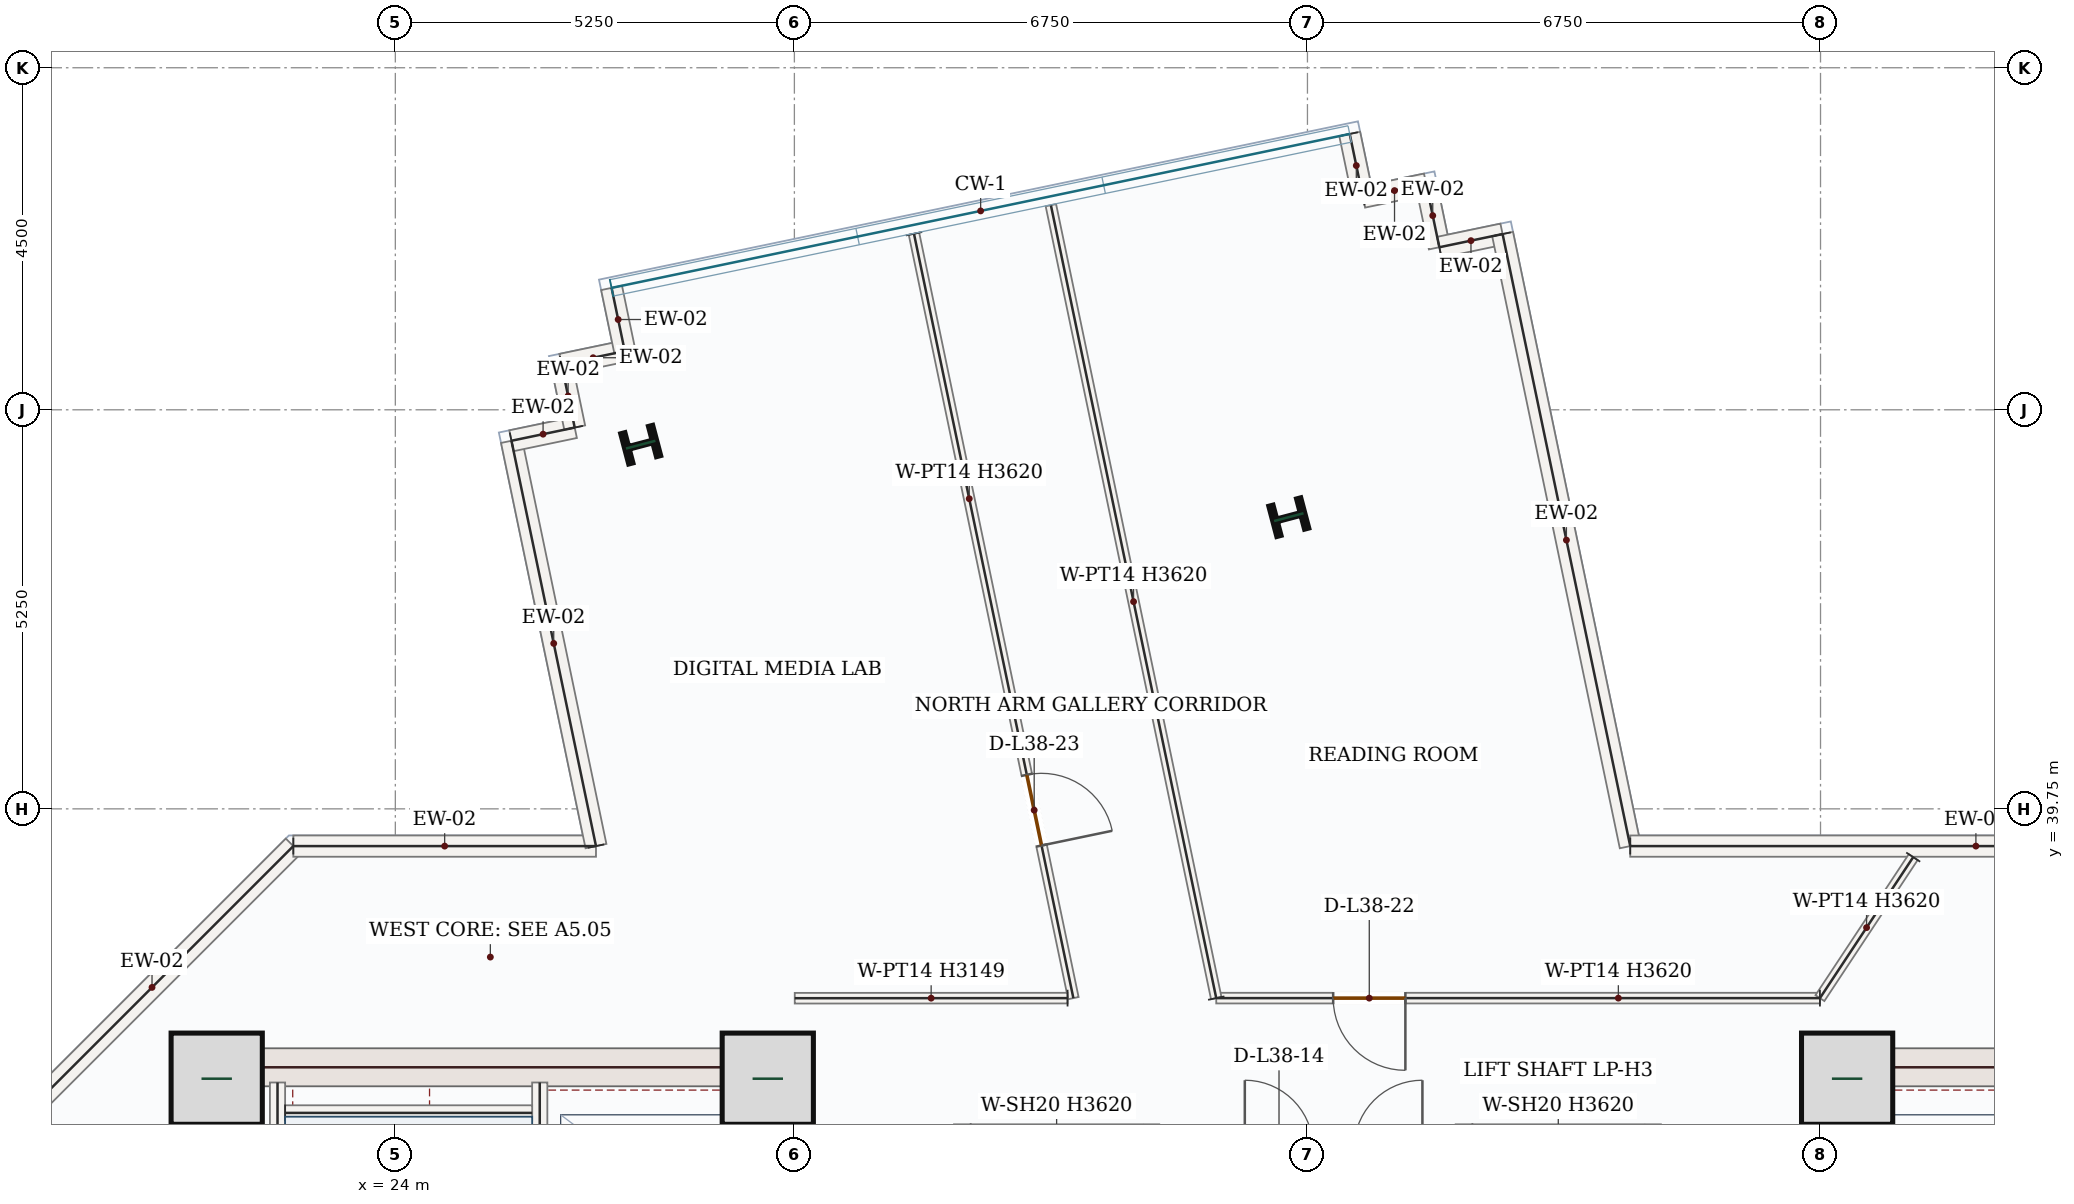
"""IFC4 building model, lengths in metres.
Left out: names, types, materials, properties, quantities, classifications, styles, units other than length and angle.
Written with IfcOpenShell. Run it as: python <this file> out.ifc"""

import sys

from ifc_helpers import new_model, si_unit, direction, frame, frame_2d, origin, origin_2d, place, context, subcontext, project, spatial, rectangle, i_section, extrude, source, transform, mapped, element, fill, save


model = new_model("IFC4")
c1 = context("Model", 3, precision=1e-05, world=origin(), true_north=direction((0.0, 1.0)))
c2 = subcontext(c1, "Body", "Model", "MODEL_VIEW")
j1 = project(units=[si_unit("LENGTHUNIT", "METRE"), si_unit("PLANEANGLEUNIT", "RADIAN")], contexts=[c1])
p1 = place(None, origin())
s1 = spatial("IfcSite", under=j1, at=p1, CompositionType="ELEMENT")
p2 = place(p1, origin())
s2 = spatial("IfcBuilding", under=s1, at=p2, CompositionType="ELEMENT")
p3 = place(p2, frame((0.0, 0.0, 166.8)))
s3 = spatial("IfcBuildingStorey", under=s2, at=p3, CompositionType="ELEMENT", Elevation=166.8)
m1 = source(origin(), c2, "Body", "SweptSolid", [
    extrude(rectangle(XDim=8.55, YDim=0.5, at=frame_2d((4.275, 0.0))), origin(), (0.0, 0.0, 1.0), 3.62),
])
p4 = place(p3, frame((21.5, 28.05, 0.0), z_axis=(0.0, 0.0, 1.0), x_axis=(0.0, 1.0, 0.0)))
e1 = element("IfcWall", 1, at=p4, inside=s3, PredefinedType="SHEAR", context=c2, shape_type="MappedRepresentation", body=[
    mapped(m1, transform((0.0, 0.0, 0.0), x_axis=(1.0, 0.0, 0.0), y_axis=(0.0, 1.0, 0.0), z_axis=(0.0, 0.0, 1.0), scale=1.0)),
])
p5 = place(p3, frame((29.0, 28.05, 0.0), z_axis=(0.0, 0.0, 1.0), x_axis=(0.0, 1.0, 0.0)))
e2 = element("IfcWall", 2, at=p5, inside=s3, PredefinedType="SHEAR", context=c2, shape_type="SweptSolid", body=[
    extrude(rectangle(XDim=8.55, YDim=0.5, at=frame_2d((4.275, 0.0))), origin(), (0.0, 0.0, 1.0), 3.62),
])
p6 = place(p5, frame((1.5, 0.0, 0.0)))
e3 = element("IfcOpeningElement", 3, at=p6, cuts=e2, PredefinedType="OPENING", context=c2, shape_type="SweptSolid", body=[
    extrude(rectangle(XDim=1.1, YDim=2.2, at=frame_2d((0.55, 1.1))), frame((0.0, 0.26, 0.0), z_axis=(0.0, -1.0, 0.0), x_axis=(1.0, 0.0, 0.0)), (0.0, 0.0, 1.0), 0.52),
])
m2 = source(origin(), c2, "Body", "SweptSolid", [
    extrude(rectangle(XDim=7.0, YDim=0.5, at=frame_2d((3.5, 0.0))), origin(), (0.0, 0.0, 1.0), 3.62),
])
p7 = place(p3, frame((21.75, 36.35, 0.0), z_axis=(0.0, 0.0, 1.0), x_axis=(1.0, 0.0, 0.0)))
e4 = element("IfcWall", 4, at=p7, inside=s3, PredefinedType="SHEAR", context=c2, shape_type="MappedRepresentation", body=[
    mapped(m2, transform((0.0, 0.0, 0.0), x_axis=(1.0, 0.0, 0.0), y_axis=(0.0, 1.0, 0.0), z_axis=(0.0, 0.0, 1.0), scale=1.0)),
])
p8 = place(p3, frame((43.0, 28.05, 0.0), z_axis=(0.0, 0.0, 1.0), x_axis=(0.0, 1.0, 0.0)))
e5 = element("IfcWall", 5, at=p8, inside=s3, PredefinedType="SHEAR", context=c2, shape_type="SweptSolid", body=[
    extrude(rectangle(XDim=8.55, YDim=0.5, at=frame_2d((4.275, 0.0))), origin(), (0.0, 0.0, 1.0), 3.62),
])
p9 = place(p8, frame((1.5, 0.0, 0.0)))
e6 = element("IfcOpeningElement", 6, at=p9, cuts=e5, PredefinedType="OPENING", context=c2, shape_type="SweptSolid", body=[
    extrude(rectangle(XDim=1.1, YDim=2.2, at=frame_2d((0.55, 1.1))), frame((0.0, 0.26, 0.0), z_axis=(0.0, -1.0, 0.0), x_axis=(1.0, 0.0, 0.0)), (0.0, 0.0, 1.0), 0.52),
])
p10 = place(p3, frame((43.25, 36.35, 0.0), z_axis=(0.0, 0.0, 1.0), x_axis=(1.0, 0.0, 0.0)))
e7 = element("IfcWall", 7, at=p10, inside=s3, PredefinedType="SHEAR", context=c2, shape_type="MappedRepresentation", body=[
    mapped(m2, transform((0.0, 0.0, 0.0), x_axis=(1.0, 0.0, 0.0), y_axis=(0.0, 1.0, 0.0), z_axis=(0.0, 0.0, 1.0), scale=1.0)),
])
m3 = source(origin(), c2, "Body", "SweptSolid", [
    extrude(rectangle(XDim=1.2, YDim=1.2, at=origin_2d()), origin(), (0.0, 0.0, 1.0), 3.9),
])
for number, where, z_axis, x_axis in (
    (8, (21.65, 36.2, 0.0), (0.0, 0.0, 1.0), (1.0, 0.0, 0.0)),
    (9, (28.9, 36.2, 0.0), (0.0, 0.0, 1.0), (1.0, 0.0, 0.0)),
    (10, (43.1, 36.2, 0.0), (0.0, 0.0, 1.0), (1.0, 0.0, 0.0)),
):
    element("IfcColumn", number, at=place(p3, frame(where, z_axis=z_axis, x_axis=x_axis)), inside=s3, PredefinedType="COLUMN", context=c2, shape_type="MappedRepresentation", body=[
        mapped(m3, transform((0.0, 0.0, 0.0), x_axis=(1.0, 0.0, 0.0), y_axis=(0.0, 1.0, 0.0), z_axis=(0.0, 0.0, 1.0), scale=1.0)),
    ])
m4 = source(origin(), c2, "Body", "SweptSolid", [
    extrude(i_section(OverallWidth=0.412, OverallDepth=0.435, WebThickness=0.036, FlangeThickness=0.057, FilletRadius=0.018, at=origin_2d()), origin(), (0.0, 0.0, 1.0), 3.9),
])
for number, where, z_axis, x_axis in (
    (11, (35.755, 43.588, 0.0), (0.0, 0.0, 1.0), (-0.255, 0.967, 0.0)),
    (12, (27.228, 44.541, 0.0), (0.0, 0.0, 1.0), (-0.255, 0.967, 0.0)),
):
    element("IfcColumn", number, at=place(p3, frame(where, z_axis=z_axis, x_axis=x_axis)), inside=s3, PredefinedType="COLUMN", context=c2, shape_type="MappedRepresentation", body=[
        mapped(m4, transform((0.0, 0.0, 0.0), x_axis=(1.0, 0.0, 0.0), y_axis=(0.0, 1.0, 0.0), z_axis=(0.0, 0.0, 1.0), scale=1.0)),
    ])
m5 = source(origin(), c2, "Body", "SweptSolid", [
    extrude(rectangle(XDim=5.258, YDim=0.28, at=frame_2d((2.629, 0.0))), origin(), (0.0, 0.0, 1.0), 3.62),
])
p11 = place(p3, frame((18.94, 35.542, 0.0), z_axis=(0.0, 0.0, 1.0), x_axis=(0.707106781187, 0.707106781187, 0.0)))
e13 = element("IfcWall", 13, at=p11, inside=s3, PredefinedType="SOLIDWALL", context=c2, shape_type="MappedRepresentation", body=[
    mapped(m5, transform((0.0, 0.0, 0.0), x_axis=(1.0, 0.0, 0.0), y_axis=(0.0, 1.0, 0.0), z_axis=(0.0, 0.0, 1.0), scale=1.0)),
])
m6 = source(origin(), c2, "Body", "SweptSolid", [
    extrude(rectangle(XDim=3.982, YDim=0.28, at=frame_2d((1.991, 0.0))), origin(), (0.0, 0.0, 1.0), 3.62),
])
p12 = place(p3, frame((22.658, 39.26, 0.0), z_axis=(0.0, 0.0, 1.0), x_axis=(1.0, 0.0, 0.0)))
e14 = element("IfcWall", 14, at=p12, inside=s3, PredefinedType="SOLIDWALL", context=c2, shape_type="MappedRepresentation", body=[
    mapped(m6, transform((0.0, 0.0, 0.0), x_axis=(1.0, 0.0, 0.0), y_axis=(0.0, 1.0, 0.0), z_axis=(0.0, 0.0, 1.0), scale=1.0)),
])
m7 = source(origin(), c2, "Body", "SweptSolid", [
    extrude(rectangle(XDim=5.447, YDim=0.28, at=frame_2d((2.724, 0.0))), origin(), (0.0, 0.0, 1.0), 3.62),
])
p13 = place(p3, frame((26.64, 39.26, 0.0), z_axis=(0.0, 0.0, 1.0), x_axis=(-0.204151126022, 0.978939384101, 0.0)))
e15 = element("IfcWall", 15, at=p13, inside=s3, PredefinedType="SOLIDWALL", context=c2, shape_type="MappedRepresentation", body=[
    mapped(m7, transform((0.0, 0.0, 0.0), x_axis=(1.0, 0.0, 0.0), y_axis=(0.0, 1.0, 0.0), z_axis=(0.0, 0.0, 1.0), scale=1.0)),
])
m8 = source(origin(), c2, "Body", "SweptSolid", [
    extrude(rectangle(XDim=0.85, YDim=0.28, at=frame_2d((0.425, 0.0))), origin(), (0.0, 0.0, 1.0), 3.62),
])
for number, where, z_axis, x_axis in (
    (16, (25.528, 44.593, 0.0), (0.0, 0.0, 1.0), (0.979, 0.204, 0.0)),
    (17, (26.36, 44.766, 0.0), (0.0, 0.0, 1.0), (-0.204, 0.979, 0.0)),
):
    element("IfcWall", number, at=place(p3, frame(where, z_axis=z_axis, x_axis=x_axis)), inside=s3, PredefinedType="SOLIDWALL", context=c2, shape_type="MappedRepresentation", body=[
        mapped(m8, transform((0.0, 0.0, 0.0), x_axis=(1.0, 0.0, 0.0), y_axis=(0.0, 1.0, 0.0), z_axis=(0.0, 0.0, 1.0), scale=1.0)),
    ])
m9 = source(origin(), c2, "Body", "SweptSolid", [
    extrude(rectangle(XDim=0.85, YDim=0.28, at=frame_2d((0.425, 0.0))), origin(), (0.0, 0.0, 1.0), 3.62),
])
p14 = place(p3, frame((26.186, 45.598, 0.0), z_axis=(0.0, 0.0, 1.0), x_axis=(0.97893500384, 0.204172128991, 0.0)))
e18 = element("IfcWall", 18, at=p14, inside=s3, PredefinedType="SOLIDWALL", context=c2, shape_type="MappedRepresentation", body=[
    mapped(m9, transform((0.0, 0.0, 0.0), x_axis=(1.0, 0.0, 0.0), y_axis=(0.0, 1.0, 0.0), z_axis=(0.0, 0.0, 1.0), scale=1.0)),
])
for number, where, z_axis, x_axis in (
    (19, (27.019, 45.772, 0.0), (0.0, 0.0, 1.0), (-0.204, 0.979, 0.0)),
    (20, (36.556, 48.629, 0.0), (0.0, 0.0, 1.0), (0.204, -0.979, 0.0)),
    (21, (36.729, 47.797, 0.0), (0.0, 0.0, 1.0), (0.979, 0.204, 0.0)),
    (22, (37.562, 47.97, 0.0), (0.0, 0.0, 1.0), (0.204, -0.979, 0.0)),
):
    element("IfcWall", number, at=place(p3, frame(where, z_axis=z_axis, x_axis=x_axis)), inside=s3, PredefinedType="SOLIDWALL", context=c2, shape_type="MappedRepresentation", body=[
        mapped(m8, transform((0.0, 0.0, 0.0), x_axis=(1.0, 0.0, 0.0), y_axis=(0.0, 1.0, 0.0), z_axis=(0.0, 0.0, 1.0), scale=1.0)),
    ])
p15 = place(p3, frame((37.735, 47.138, 0.0), z_axis=(0.0, 0.0, 1.0), x_axis=(0.97893500384, 0.204172128991, 0.0)))
e23 = element("IfcWall", 23, at=p15, inside=s3, PredefinedType="SOLIDWALL", context=c2, shape_type="MappedRepresentation", body=[
    mapped(m9, transform((0.0, 0.0, 0.0), x_axis=(1.0, 0.0, 0.0), y_axis=(0.0, 1.0, 0.0), z_axis=(0.0, 0.0, 1.0), scale=1.0)),
])
m10 = source(origin(), c2, "Body", "SweptSolid", [
    extrude(rectangle(XDim=8.225, YDim=0.28, at=frame_2d((4.113, 0.0))), origin(), (0.0, 0.0, 1.0), 3.62),
])
p16 = place(p3, frame((38.567, 47.312, 0.0), z_axis=(0.0, 0.0, 1.0), x_axis=(0.204152195211, -0.978939161128, 0.0)))
e24 = element("IfcWall", 24, at=p16, inside=s3, PredefinedType="SOLIDWALL", context=c2, shape_type="MappedRepresentation", body=[
    mapped(m10, transform((0.0, 0.0, 0.0), x_axis=(1.0, 0.0, 0.0), y_axis=(0.0, 1.0, 0.0), z_axis=(0.0, 0.0, 1.0), scale=1.0)),
])
m11 = source(origin(), c2, "Body", "SweptSolid", [
    extrude(rectangle(XDim=9.095, YDim=0.28, at=frame_2d((4.548, 0.0))), origin(), (0.0, 0.0, 1.0), 3.62),
])
p17 = place(p3, frame((40.247, 39.26, 0.0), z_axis=(0.0, 0.0, 1.0), x_axis=(1.0, 0.0, 0.0)))
e25 = element("IfcWall", 25, at=p17, inside=s3, PredefinedType="SOLIDWALL", context=c2, shape_type="MappedRepresentation", body=[
    mapped(m11, transform((0.0, 0.0, 0.0), x_axis=(1.0, 0.0, 0.0), y_axis=(0.0, 1.0, 0.0), z_axis=(0.0, 0.0, 1.0), scale=1.0)),
])
m12 = source(origin(), c2, "Body", "SweptSolid", [
    extrude(rectangle(XDim=7.87, YDim=0.2, at=frame_2d((3.935, 0.0))), origin(), (0.0, 0.0, 1.0), 3.62),
])
p18 = place(p3, frame((22.45, 28.28, 0.0), z_axis=(0.0, 0.0, 1.0), x_axis=(0.0, 1.0, 0.0)))
e26 = element("IfcWall", 26, at=p18, inside=s3, PredefinedType="SOLIDWALL", context=c2, shape_type="MappedRepresentation", body=[
    mapped(m12, transform((0.0, 0.0, 0.0), x_axis=(1.0, 0.0, 0.0), y_axis=(0.0, 1.0, 0.0), z_axis=(0.0, 0.0, 1.0), scale=1.0)),
])
p19 = place(p3, frame((25.9, 28.15, 0.0), z_axis=(0.0, 0.0, 1.0), x_axis=(0.0, 1.0, 0.0)))
e27 = element("IfcWall", 27, at=p19, inside=s3, PredefinedType="SOLIDWALL", context=c2, shape_type="SweptSolid", body=[
    extrude(rectangle(XDim=8.0, YDim=0.2, at=frame_2d((4.0, 0.0))), origin(), (0.0, 0.0, 1.0), 3.62),
])
p20 = place(p19, frame((0.4, 0.0, 0.0)))
e28 = element("IfcOpeningElement", 28, at=p20, cuts=e27, PredefinedType="OPENING", context=c2, shape_type="SweptSolid", body=[
    extrude(rectangle(XDim=1.05, YDim=2.15, at=frame_2d((0.525, 1.075))), frame((0.0, 0.11, 0.0), z_axis=(0.0, -1.0, 0.0), x_axis=(1.0, 0.0, 0.0)), (0.0, 0.0, 1.0), 0.22),
])
m13 = source(origin(), c2, "Body", "SweptSolid", [
    extrude(rectangle(XDim=3.25, YDim=0.2, at=frame_2d((1.625, 0.0))), origin(), (0.0, 0.0, 1.0), 3.62),
])
p21 = place(p3, frame((22.55, 35.75, 0.0), z_axis=(0.0, 0.0, 1.0), x_axis=(1.0, 0.0, 0.0)))
e29 = element("IfcWall", 29, at=p21, inside=s3, PredefinedType="SOLIDWALL", context=c2, shape_type="MappedRepresentation", body=[
    mapped(m13, transform((0.0, 0.0, 0.0), x_axis=(1.0, 0.0, 0.0), y_axis=(0.0, 1.0, 0.0), z_axis=(0.0, 0.0, 1.0), scale=1.0)),
])
m14 = source(origin(), c2, "Body", "SweptSolid", [
    extrude(rectangle(XDim=2.4, YDim=0.2, at=frame_2d((1.2, 0.0))), origin(), (0.0, 0.0, 1.0), 3.62),
])
for number, where, z_axis, x_axis in (
    (30, (31.45, 33.2, 0.0), (0.0, 0.0, 1.0), (0.0, 1.0, 0.0)),
    (31, (33.95, 33.2, 0.0), (0.0, 0.0, 1.0), (0.0, 1.0, 0.0)),
    (32, (38.05, 33.2, 0.0), (0.0, 0.0, 1.0), (0.0, 1.0, 0.0)),
    (33, (40.55, 33.2, 0.0), (0.0, 0.0, 1.0), (0.0, 1.0, 0.0)),
):
    element("IfcWall", number, at=place(p3, frame(where, z_axis=z_axis, x_axis=x_axis)), inside=s3, PredefinedType="SOLIDWALL", context=c2, shape_type="MappedRepresentation", body=[
        mapped(m14, transform((0.0, 0.0, 0.0), x_axis=(1.0, 0.0, 0.0), y_axis=(0.0, 1.0, 0.0), z_axis=(0.0, 0.0, 1.0), scale=1.0)),
    ])
p22 = place(p3, frame((42.742, 37.26, 0.0), z_axis=(0.0, 0.0, 1.0), x_axis=(-1.0, 0.0, 0.0)))
e34 = element("IfcWall", 34, at=p22, inside=s3, PredefinedType="PARTITIONING", context=c2, shape_type="SweptSolid", body=[
    extrude(rectangle(XDim=7.942, YDim=0.14, at=frame_2d((3.971, 0.0))), origin(), (0.0, 0.0, 1.0), 3.62),
])
p23 = place(p22, frame((5.454, 0.0, 0.0)))
e35 = element("IfcOpeningElement", 35, at=p23, cuts=e34, PredefinedType="OPENING", context=c2, shape_type="SweptSolid", body=[
    extrude(rectangle(XDim=0.95, YDim=2.15, at=frame_2d((0.475, 1.075))), frame((0.0, 0.08, 0.0), z_axis=(0.0, -1.0, 0.0), x_axis=(1.0, 0.0, 0.0)), (0.0, 0.0, 1.0), 0.16),
])
m15 = source(origin(), c2, "Body", "SweptSolid", [
    extrude(rectangle(XDim=10.656, YDim=0.14, at=frame_2d((5.328, 0.0))), origin(), (0.0, 0.0, 1.0), 3.62),
])
p24 = place(p3, frame((34.8, 37.26, 0.0), z_axis=(0.0, 0.0, 1.0), x_axis=(-0.204159189901, 0.978937702399, 0.0)))
e36 = element("IfcWall", 36, at=p24, inside=s3, PredefinedType="PARTITIONING", context=c2, shape_type="MappedRepresentation", body=[
    mapped(m15, transform((0.0, 0.0, 0.0), x_axis=(1.0, 0.0, 0.0), y_axis=(0.0, 1.0, 0.0), z_axis=(0.0, 0.0, 1.0), scale=1.0)),
])
m16 = source(origin(), c2, "Body", "SweptSolid", [
    extrude(rectangle(XDim=2.224, YDim=0.14, at=frame_2d((1.112, 0.0))), origin(), (0.0, 0.0, 1.0), 3.62),
])
p25 = place(p3, frame((43.969, 39.115, 0.0), z_axis=(0.0, 0.0, 1.0), x_axis=(-0.551783828078, -0.833987174405, 0.0)))
e37 = element("IfcWall", 37, at=p25, inside=s3, PredefinedType="PARTITIONING", context=c2, shape_type="MappedRepresentation", body=[
    mapped(m16, transform((0.0, 0.0, 0.0), x_axis=(1.0, 0.0, 0.0), y_axis=(0.0, 1.0, 0.0), z_axis=(0.0, 0.0, 1.0), scale=1.0)),
])
p26 = place(p3, frame((30.823, 47.316, 0.0), z_axis=(0.0, 0.0, 1.0), x_axis=(0.204130779611, -0.978943626985, 0.0)))
e38 = element("IfcWall", 38, at=p26, inside=s3, PredefinedType="PARTITIONING", context=c2, shape_type="SweptSolid", body=[
    extrude(rectangle(XDim=10.272, YDim=0.14, at=frame_2d((5.136, 0.0))), origin(), (0.0, 0.0, 1.0), 3.62),
])
p27 = place(p26, frame((7.271, 0.0, 0.0)))
e39 = element("IfcOpeningElement", 39, at=p27, cuts=e38, PredefinedType="OPENING", context=c2, shape_type="SweptSolid", body=[
    extrude(rectangle(XDim=0.95, YDim=2.15, at=frame_2d((0.475, 1.075))), frame((0.0, 0.08, 0.0), z_axis=(0.0, -1.0, 0.0), x_axis=(1.0, 0.0, 0.0)), (0.0, 0.0, 1.0), 0.16),
])
m17 = source(origin(), c2, "Body", "SweptSolid", [
    extrude(rectangle(XDim=3.589, YDim=0.14, at=frame_2d((1.794, 0.0))), origin(), (0.0, 0.0, 1.0), 3.149),
])
p28 = place(p3, frame((32.844, 37.26, 0.0), z_axis=(0.0, 0.0, 1.0), x_axis=(-0.999999942162, -0.000340112898, 0.0)))
e40 = element("IfcWall", 40, at=p28, inside=s3, PredefinedType="PARTITIONING", context=c2, shape_type="MappedRepresentation", body=[
    mapped(m17, transform((0.0, 0.0, 0.0), x_axis=(1.0, 0.0, 0.0), y_axis=(0.0, 1.0, 0.0), z_axis=(0.0, 0.0, 1.0), scale=1.0)),
])
m18 = source(origin(), c2, "Body", "SweptSolid", [
    extrude(rectangle(XDim=0.95, YDim=2.15, at=frame_2d((0.475, 1.075))), frame((0.0, 0.025, 0.0), z_axis=(0.0, -1.0, 0.0), x_axis=(1.0, 0.0, 0.0)), (0.0, 0.0, 1.0), 0.05),
])
p29 = place(p23, origin())
e41 = element("IfcDoor", 41, at=p29, inside=s3, OperationType="SINGLE_SWING_LEFT", PredefinedType="DOOR", context=c2, shape_type="MappedRepresentation", body=[
    mapped(m18, transform((0.0, 0.0, 0.0), x_axis=(1.0, 0.0, 0.0), y_axis=(0.0, 1.0, 0.0), z_axis=(0.0, 0.0, 1.0), scale=1.0)),
])
fill(e35, e41)
p30 = place(p27, origin())
e42 = element("IfcDoor", 42, at=p30, inside=s3, OperationType="SINGLE_SWING_RIGHT", PredefinedType="DOOR", context=c2, shape_type="MappedRepresentation", body=[
    mapped(m18, transform((0.0, 0.0, 0.0), x_axis=(1.0, 0.0, 0.0), y_axis=(0.0, 1.0, 0.0), z_axis=(0.0, 0.0, 1.0), scale=1.0)),
])
fill(e39, e42)
save(model, sys.argv[1])
